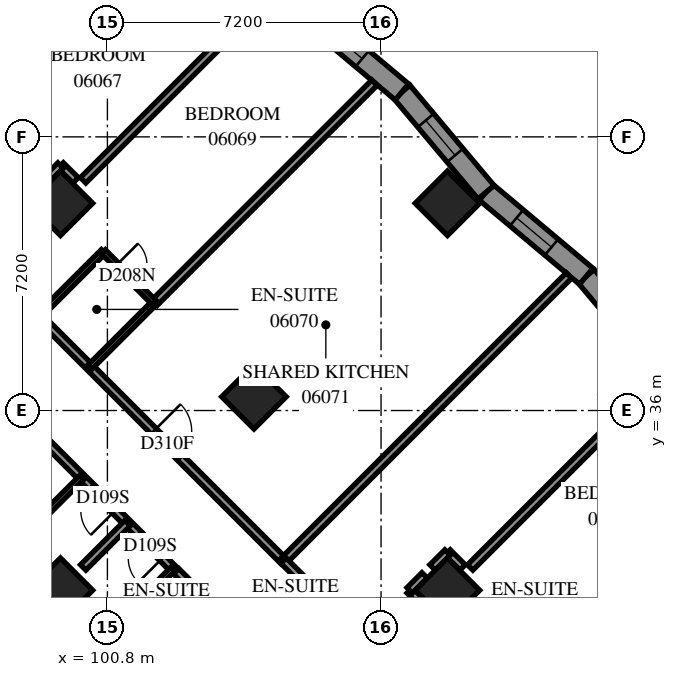
"""IFC4 building model, lengths in metres.
Left out: names, types, materials, properties, quantities, classifications, styles, units other than length and angle.
Written with IfcOpenShell. Run it as: python <this file> out.ifc"""

import sys

from ifc_helpers import new_model, si_unit, direction, frame, frame_2d, origin, origin_2d, place, context, subcontext, project, spatial, polyline, rectangle, outline, extrude, element, fill, save


model = new_model("IFC4")
c1 = context("Model", 3, precision=1e-05, world=origin(), true_north=direction((0.0, 1.0)))
c2 = subcontext(c1, "Body", "Model", "MODEL_VIEW")
j1 = project(units=[si_unit("LENGTHUNIT", "METRE"), si_unit("PLANEANGLEUNIT", "RADIAN")], contexts=[c1])
p1 = place(None, origin())
s1 = spatial("IfcSite", under=j1, at=p1, CompositionType="ELEMENT")
p2 = place(p1, origin())
s2 = spatial("IfcBuilding", under=s1, at=p2, CompositionType="ELEMENT")
p3 = place(p2, frame((0.0, 0.0, 27.0)))
s3 = spatial("IfcBuildingStorey", under=s2, at=p3, CompositionType="ELEMENT", Elevation=27.0)
for number, where, z_axis, x_axis in (
    (1, (99.565, 41.453, 0.0), (0.0, 0.0, 1.0), (0.707, -0.707, 0.0)),
    (2, (109.747, 41.453, 0.0), (0.0, 0.0, 1.0), (0.707, -0.707, 0.0)),
    (3, (104.656, 36.362, 0.0), (0.0, 0.0, 1.0), (0.707, -0.707, 0.0)),
    (4, (99.565, 31.271, 0.0), (0.0, 0.0, 1.0), (0.707, -0.707, 0.0)),
    (5, (109.747, 31.271, 0.0), (0.0, 0.0, 1.0), (0.707, -0.707, 0.0)),
):
    element("IfcColumn", number, at=place(p3, frame(where, z_axis=z_axis, x_axis=x_axis)), inside=s3, PredefinedType="COLUMN", context=c2, shape_type="SweptSolid", body=[
        extrude(rectangle(XDim=1.2, YDim=1.2, at=origin_2d()), origin(), (0.0, 0.0, 1.0), 3.1),
    ])
p4 = place(p3, frame((115.627, 36.876, 0.0), z_axis=(0.0, 0.0, 1.0), x_axis=(-0.6427914459, 0.7660412241, 0.0)))
e6 = element("IfcWall", 6, at=p4, inside=s3, PredefinedType="SOLIDWALL", context=c2, shape_type="SweptSolid", body=[
    extrude(outline(polyline([(0.048, -0.275), (3.49, -0.275), (3.442, 0.275), (-0.048, 0.275), (0.048, -0.275)])), origin(), (0.0, 0.0, 1.0), 3.1),
])
p5 = place(p4, frame((1.121, 0.0, 0.5)))
e7 = element("IfcOpeningElement", 7, at=p5, cuts=e6, PredefinedType="OPENING", context=c2, shape_type="SweptSolid", body=[
    extrude(rectangle(XDim=1.2, YDim=2.45, at=frame_2d((0.6, 1.225))), frame((0.0, 0.285, 0.0), z_axis=(0.0, -1.0, 0.0), x_axis=(1.0, 0.0, 0.0)), (0.0, 0.0, 1.0), 0.57),
])
p6 = place(p3, frame((113.399, 39.532, 0.0), z_axis=(0.0, 0.0, 1.0), x_axis=(-0.7660429609, 0.6427893761, 0.0)))
e8 = element("IfcWall", 8, at=p6, inside=s3, PredefinedType="SOLIDWALL", context=c2, shape_type="SweptSolid", body=[
    extrude(outline(polyline([(-0.024, -0.275), (3.418, -0.275), (3.466, 0.275), (0.024, 0.275), (-0.024, -0.275)])), origin(), (0.0, 0.0, 1.0), 3.1),
])
p7 = place(p6, frame((1.192, 0.0, 0.5)))
e9 = element("IfcOpeningElement", 9, at=p7, cuts=e8, PredefinedType="OPENING", context=c2, shape_type="SweptSolid", body=[
    extrude(rectangle(XDim=1.2, YDim=2.45, at=frame_2d((0.6, 1.225))), frame((0.0, 0.285, 0.0), z_axis=(0.0, -1.0, 0.0), x_axis=(1.0, 0.0, 0.0)), (0.0, 0.0, 1.0), 0.57),
])
p8 = place(p3, frame((110.762, 41.744, 0.0), z_axis=(0.0, 0.0, 1.0), x_axis=(-0.6428036801, 0.7660309582, 0.0)))
e10 = element("IfcWall", 10, at=p8, inside=s3, PredefinedType="SOLIDWALL", context=c2, shape_type="SweptSolid", body=[
    extrude(outline(polyline([(0.024, -0.275), (3.466, -0.275), (3.418, 0.275), (-0.024, 0.275), (0.024, -0.275)])), origin(), (0.0, 0.0, 1.0), 3.1),
])
p9 = place(p8, frame((1.266, 0.0, 0.5)))
e11 = element("IfcOpeningElement", 11, at=p9, cuts=e10, PredefinedType="OPENING", context=c2, shape_type="SweptSolid", body=[
    extrude(rectangle(XDim=1.2, YDim=2.45, at=frame_2d((0.6, 1.225))), frame((0.0, 0.285, 0.0), z_axis=(0.0, -1.0, 0.0), x_axis=(1.0, 0.0, 0.0)), (0.0, 0.0, 1.0), 0.57),
])
p10 = place(p3, frame((108.549, 44.381, 0.0), z_axis=(0.0, 0.0, 1.0), x_axis=(-0.7660309582, 0.6428036801, 0.0)))
e12 = element("IfcWall", 12, at=p10, inside=s3, PredefinedType="SOLIDWALL", context=c2, shape_type="SweptSolid", body=[
    extrude(outline(polyline([(-0.024, -0.275), (3.418, -0.275), (3.466, 0.275), (0.024, 0.275), (-0.024, -0.275)])), origin(), (0.0, 0.0, 1.0), 3.1),
])
p11 = place(p10, frame((1.364, 0.0, 0.5)))
e13 = element("IfcOpeningElement", 13, at=p11, cuts=e12, PredefinedType="OPENING", context=c2, shape_type="SweptSolid", body=[
    extrude(rectangle(XDim=1.2, YDim=2.45, at=frame_2d((0.6, 1.225))), frame((0.0, 0.285, 0.0), z_axis=(0.0, -1.0, 0.0), x_axis=(1.0, 0.0, 0.0)), (0.0, 0.0, 1.0), 0.57),
])
p12 = place(p3, frame((94.895, 42.581, 0.0), z_axis=(0.0, 0.0, 1.0), x_axis=(0.7071067812, -0.7071067812, 0.0)))
e14 = element("IfcWall", 14, at=p12, inside=s3, PredefinedType="PARTITIONING", context=c2, shape_type="SweptSolid", body=[
    extrude(rectangle(XDim=14.9, YDim=0.2, at=frame_2d((7.45, 0.0))), origin(), (0.0, 0.0, 1.0), 3.1),
])
p13 = place(p12, frame((2.8, 0.0, 0.0)))
e15 = element("IfcOpeningElement", 15, at=p13, cuts=e14, PredefinedType="OPENING", context=c2, shape_type="SweptSolid", body=[
    extrude(rectangle(XDim=0.9, YDim=2.1, at=frame_2d((0.45, 1.05))), frame((0.0, 0.11, 0.0), z_axis=(0.0, -1.0, 0.0), x_axis=(1.0, 0.0, 0.0)), (0.0, 0.0, 1.0), 0.22),
])
p14 = place(p12, frame((4.348, 0.0, 0.0)))
e16 = element("IfcOpeningElement", 16, at=p14, cuts=e14, PredefinedType="OPENING", context=c2, shape_type="SweptSolid", body=[
    extrude(rectangle(XDim=0.9, YDim=2.1, at=frame_2d((0.45, 1.05))), frame((0.0, 0.11, 0.0), z_axis=(0.0, -1.0, 0.0), x_axis=(1.0, 0.0, 0.0)), (0.0, 0.0, 1.0), 0.22),
])
p15 = place(p12, frame((10.073, 0.0, 0.0)))
e17 = element("IfcOpeningElement", 17, at=p15, cuts=e14, PredefinedType="OPENING", context=c2, shape_type="SweptSolid", body=[
    extrude(rectangle(XDim=1.0, YDim=2.1, at=frame_2d((0.5, 1.05))), frame((0.0, 0.11, 0.0), z_axis=(0.0, -1.0, 0.0), x_axis=(1.0, 0.0, 0.0)), (0.0, 0.0, 1.0), 0.22),
])
p16 = place(p3, frame((102.609, 31.769, 0.0), z_axis=(0.0, 0.0, 1.0), x_axis=(0.7071067812, -0.7071067812, 0.0)))
e18 = element("IfcWall", 18, at=p16, inside=s3, PredefinedType="PARTITIONING", context=c2, shape_type="SweptSolid", body=[
    extrude(rectangle(XDim=10.723, YDim=0.2, at=frame_2d((5.361, 0.0))), origin(), (0.0, 0.0, 1.0), 3.1),
])
p17 = place(p16, frame((4.15, 0.0, 0.0)))
e19 = element("IfcOpeningElement", 19, at=p17, cuts=e18, PredefinedType="OPENING", context=c2, shape_type="SweptSolid", body=[
    extrude(rectangle(XDim=0.9, YDim=2.1, at=frame_2d((0.45, 1.05))), frame((0.0, 0.11, 0.0), z_axis=(0.0, -1.0, 0.0), x_axis=(1.0, 0.0, 0.0)), (0.0, 0.0, 1.0), 0.22),
])
p18 = place(p16, frame((5.8, 0.0, 0.0)))
e20 = element("IfcOpeningElement", 20, at=p18, cuts=e18, PredefinedType="OPENING", context=c2, shape_type="SweptSolid", body=[
    extrude(rectangle(XDim=0.9, YDim=2.1, at=frame_2d((0.45, 1.05))), frame((0.0, 0.11, 0.0), z_axis=(0.0, -1.0, 0.0), x_axis=(1.0, 0.0, 0.0)), (0.0, 0.0, 1.0), 0.22),
])
p19 = place(p3, frame((105.437, 32.045, 0.0), z_axis=(0.0, 0.0, 1.0), x_axis=(0.7070125995, 0.7072009503, 0.0)))
e21 = element("IfcWall", 21, at=p19, inside=s3, PredefinedType="PARTITIONING", context=c2, shape_type="SweptSolid", body=[
    extrude(rectangle(XDim=10.618, YDim=0.2, at=frame_2d((5.309, 0.0))), origin(), (0.0, 0.0, 1.0), 3.1),
])
p20 = place(p3, frame((94.901, 42.583, 0.0), z_axis=(0.0, 0.0, 1.0), x_axis=(0.7072154749, 0.7069980708, 0.0)))
e22 = element("IfcWall", 22, at=p20, inside=s3, PredefinedType="PARTITIONING", context=c2, shape_type="SweptSolid", body=[
    extrude(rectangle(XDim=9.2, YDim=0.2, at=frame_2d((4.6, 0.0))), origin(), (0.0, 0.0, 1.0), 3.1),
])
p21 = place(p3, frame((102.039, 38.837, 0.0), z_axis=(0.0, 0.0, 1.0), x_axis=(0.7071067812, 0.7071067812, 0.0)))
e23 = element("IfcWall", 23, at=p21, inside=s3, PredefinedType="PARTITIONING", context=c2, shape_type="SweptSolid", body=[
    extrude(rectangle(XDim=8.188, YDim=0.2, at=frame_2d((4.094, 0.0))), origin(), (0.0, 0.0, 1.0), 3.1),
])
p22 = place(p3, frame((96.947, 43.929, 0.0), z_axis=(0.0, 0.0, 1.0), x_axis=(0.7071067812, 0.7071067812, 0.0)))
e24 = element("IfcWall", 24, at=p22, inside=s3, PredefinedType="PARTITIONING", context=c2, shape_type="SweptSolid", body=[
    extrude(rectangle(XDim=8.159, YDim=0.2, at=frame_2d((4.079, 0.0))), origin(), (0.0, 0.0, 1.0), 3.1),
])
p23 = place(p3, frame((102.531, 31.833, 0.0), z_axis=(0.0, 0.0, 1.0), x_axis=(-0.7070095491, 0.7072039999, 0.0)))
e25 = element("IfcWall", 25, at=p23, inside=s3, PredefinedType="PARTITIONING", context=c2, shape_type="SweptSolid", body=[
    extrude(rectangle(XDim=7.2, YDim=0.2, at=frame_2d((3.6, 0.0))), origin(), (0.0, 0.0, 1.0), 3.1),
])
p24 = place(p23, frame((2.165, 0.0, 0.0)))
e26 = element("IfcOpeningElement", 26, at=p24, cuts=e25, PredefinedType="OPENING", context=c2, shape_type="SweptSolid", body=[
    extrude(rectangle(XDim=0.9, YDim=2.1, at=frame_2d((0.45, 1.05))), frame((0.0, 0.11, 0.0), z_axis=(0.0, -1.0, 0.0), x_axis=(1.0, 0.0, 0.0)), (0.0, 0.0, 1.0), 0.22),
])
p25 = place(p23, frame((0.4, 0.0, 0.0)))
e27 = element("IfcOpeningElement", 27, at=p25, cuts=e25, PredefinedType="OPENING", context=c2, shape_type="SweptSolid", body=[
    extrude(rectangle(XDim=0.9, YDim=2.1, at=frame_2d((0.45, 1.05))), frame((0.0, 0.11, 0.0), z_axis=(0.0, -1.0, 0.0), x_axis=(1.0, 0.0, 0.0)), (0.0, 0.0, 1.0), 0.22),
])
p26 = place(p3, frame((110.345, 31.871, 0.0), z_axis=(0.0, 0.0, 1.0), x_axis=(0.7071067812, 0.7071067812, 0.0)))
e28 = element("IfcWall", 28, at=p26, inside=s3, PredefinedType="PARTITIONING", context=c2, shape_type="SweptSolid", body=[
    extrude(rectangle(XDim=5.504, YDim=0.2, at=frame_2d((2.752, 0.0))), origin(), (0.0, 0.0, 1.0), 3.1),
])
p27 = place(p3, frame((100.161, 42.057, 0.0), z_axis=(0.0, 0.0, 1.0), x_axis=(0.7072884866, 0.706925029, 0.0)))
e29 = element("IfcWall", 29, at=p27, inside=s3, PredefinedType="PARTITIONING", context=c2, shape_type="SweptSolid", body=[
    extrude(rectangle(XDim=5.503, YDim=0.2, at=frame_2d((2.751, 0.0))), origin(), (0.0, 0.0, 1.0), 3.1),
])
p28 = place(p3, frame((105.435, 32.049, 0.0), z_axis=(0.0, 0.0, 1.0), x_axis=(0.7074545101, -0.7067588812, 0.0)))
e30 = element("IfcWall", 30, at=p28, inside=s3, PredefinedType="PARTITIONING", context=c2, shape_type="SweptSolid", body=[
    extrude(rectangle(XDim=2.875, YDim=0.2, at=frame_2d((1.438, 0.0))), origin(), (0.0, 0.0, 1.0), 3.1),
])
for number, where, z_axis, x_axis in (
    (31, (100.34, 37.142, 0.0), (0.0, 0.0, 1.0), (0.708, 0.707, 0.0)),
    (32, (98.996, 38.486, 0.0), (0.0, 0.0, 1.0), (0.708, 0.707, 0.0)),
):
    element("IfcWall", number, at=place(p3, frame(where, z_axis=z_axis, x_axis=x_axis)), inside=s3, PredefinedType="PARTITIONING", context=c2, shape_type="SweptSolid", body=[
        extrude(rectangle(XDim=2.4, YDim=0.15, at=frame_2d((1.2, 0.0))), origin(), (0.0, 0.0, 1.0), 3.1),
    ])
for number, where, z_axis, x_axis in (
    (33, (100.837, 30.141, 0.0), (0.0, 0.0, 1.0), (0.707, 0.707, 0.0)),
    (34, (98.433, 32.545, 0.0), (0.0, 0.0, 1.0), (0.707, 0.707, 0.0)),
):
    element("IfcWall", number, at=place(p3, frame(where, z_axis=z_axis, x_axis=x_axis)), inside=s3, PredefinedType="PARTITIONING", context=c2, shape_type="SweptSolid", body=[
        extrude(rectangle(XDim=2.398, YDim=0.15, at=frame_2d((1.199, 0.0))), origin(), (0.0, 0.0, 1.0), 3.1),
    ])
p29 = place(p3, frame((100.693, 40.177, 0.0), z_axis=(0.0, 0.0, 1.0), x_axis=(0.7071067812, -0.7071067812, 0.0)))
e35 = element("IfcWall", 35, at=p29, inside=s3, PredefinedType="PARTITIONING", context=c2, shape_type="SweptSolid", body=[
    extrude(rectangle(XDim=1.901, YDim=0.15, at=frame_2d((0.95, 0.0))), origin(), (0.0, 0.0, 1.0), 3.1),
])
p30 = place(p29, frame((0.493, 0.0, 0.0)))
e36 = element("IfcOpeningElement", 36, at=p30, cuts=e35, PredefinedType="OPENING", context=c2, shape_type="SweptSolid", body=[
    extrude(rectangle(XDim=0.8, YDim=2.1, at=frame_2d((0.4, 1.05))), frame((0.0, 0.085, 0.0), z_axis=(0.0, -1.0, 0.0), x_axis=(1.0, 0.0, 0.0)), (0.0, 0.0, 1.0), 0.17),
])
p31 = place(p3, frame((100.163, 31.871, 0.0), z_axis=(0.0, 0.0, 1.0), x_axis=(0.7071067812, 0.7071067812, 0.0)))
e37 = element("IfcWall", 37, at=p31, inside=s3, PredefinedType="PARTITIONING", context=c2, shape_type="SweptSolid", body=[
    extrude(rectangle(XDim=1.652, YDim=0.2, at=frame_2d((0.826, 0.0))), origin(), (0.0, 0.0, 1.0), 3.1),
])
for number, where, z_axis, x_axis in (
    (38, (108.754, 31.268, 0.0), (0.0, 0.0, 1.0), (0.707, -0.707, 0.0)),
    (39, (109.751, 32.265, 0.0), (0.0, 0.0, 1.0), (0.707, -0.707, 0.0)),
    (40, (109.355, 31.871, 0.0), (0.0, 0.0, 1.0), (0.707, 0.707, 0.0)),
    (41, (108.753, 31.269, 0.0), (0.0, 0.0, 1.0), (0.707, 0.707, 0.0)),
):
    element("IfcWall", number, at=place(p3, frame(where, z_axis=z_axis, x_axis=x_axis)), inside=s3, PredefinedType="PARTITIONING", context=c2, shape_type="SweptSolid", body=[
        extrude(rectangle(XDim=0.557, YDim=0.2, at=frame_2d((0.279, 0.0))), origin(), (0.0, 0.0, 1.0), 3.1),
    ])
p32 = place(p3, frame((99.571, 42.449, 0.0), z_axis=(0.0, 0.0, 1.0), x_axis=(0.7089037401, -0.705305244, 0.0)))
e42 = element("IfcWall", 42, at=p32, inside=s3, PredefinedType="PARTITIONING", context=c2, shape_type="SweptSolid", body=[
    extrude(rectangle(XDim=0.556, YDim=0.2, at=frame_2d((0.278, 0.0))), origin(), (0.0, 0.0, 1.0), 3.1),
])
p33 = place(p3, frame((99.175, 42.055, 0.0), z_axis=(0.0, 0.0, 1.0), x_axis=(0.7071067812, 0.7071067812, 0.0)))
e43 = element("IfcWall", 43, at=p33, inside=s3, PredefinedType="PARTITIONING", context=c2, shape_type="SweptSolid", body=[
    extrude(rectangle(XDim=0.554, YDim=0.2, at=frame_2d((0.277, 0.0))), origin(), (0.0, 0.0, 1.0), 3.1),
])
p34 = place(p7, origin())
e44 = element("IfcWindow", 44, at=p34, inside=s3, PartitioningType="SINGLE_PANEL", PredefinedType="WINDOW", context=c2, shape_type="SweptSolid", body=[
    extrude(rectangle(XDim=1.2, YDim=2.45, at=frame_2d((0.6, 1.225))), frame((0.0, 0.155, 0.0), z_axis=(0.0, -1.0, 0.0), x_axis=(1.0, 0.0, 0.0)), (0.0, 0.0, 1.0), 0.06),
])
fill(e9, e44)
p35 = place(p9, origin())
e45 = element("IfcWindow", 45, at=p35, inside=s3, PartitioningType="SINGLE_PANEL", PredefinedType="WINDOW", context=c2, shape_type="SweptSolid", body=[
    extrude(rectangle(XDim=1.2, YDim=2.45, at=frame_2d((0.6, 1.225))), frame((0.0, 0.155, 0.0), z_axis=(0.0, -1.0, 0.0), x_axis=(1.0, 0.0, 0.0)), (0.0, 0.0, 1.0), 0.06),
])
fill(e11, e45)
p36 = place(p11, origin())
e46 = element("IfcWindow", 46, at=p36, inside=s3, PartitioningType="SINGLE_PANEL", PredefinedType="WINDOW", context=c2, shape_type="SweptSolid", body=[
    extrude(rectangle(XDim=1.2, YDim=2.45, at=frame_2d((0.6, 1.225))), frame((0.0, 0.155, 0.0), z_axis=(0.0, -1.0, 0.0), x_axis=(1.0, 0.0, 0.0)), (0.0, 0.0, 1.0), 0.06),
])
fill(e13, e46)
p37 = place(p30, origin())
e47 = element("IfcDoor", 47, at=p37, inside=s3, OperationType="SINGLE_SWING_RIGHT", PredefinedType="DOOR", context=c2, shape_type="SweptSolid", body=[
    extrude(rectangle(XDim=0.8, YDim=2.1, at=frame_2d((0.4, 1.05))), frame((0.0, 0.025, 0.0), z_axis=(0.0, -1.0, 0.0), x_axis=(1.0, 0.0, 0.0)), (0.0, 0.0, 1.0), 0.05),
])
fill(e36, e47)
p38 = place(p15, origin())
e48 = element("IfcDoor", 48, at=p38, inside=s3, OperationType="SINGLE_SWING_RIGHT", PredefinedType="DOOR", context=c2, shape_type="SweptSolid", body=[
    extrude(rectangle(XDim=1.0, YDim=2.1, at=frame_2d((0.5, 1.05))), frame((0.0, 0.025, 0.0), z_axis=(0.0, -1.0, 0.0), x_axis=(1.0, 0.0, 0.0)), (0.0, 0.0, 1.0), 0.05),
])
fill(e17, e48)
p39 = place(p24, origin())
e49 = element("IfcDoor", 49, at=p39, inside=s3, OperationType="SINGLE_SWING_LEFT", PredefinedType="DOOR", context=c2, shape_type="SweptSolid", body=[
    extrude(rectangle(XDim=0.9, YDim=2.1, at=frame_2d((0.45, 1.05))), frame((0.0, 0.025, 0.0), z_axis=(0.0, -1.0, 0.0), x_axis=(1.0, 0.0, 0.0)), (0.0, 0.0, 1.0), 0.05),
])
fill(e26, e49)
p40 = place(p25, origin())
e50 = element("IfcDoor", 50, at=p40, inside=s3, OperationType="SINGLE_SWING_RIGHT", PredefinedType="DOOR", context=c2, shape_type="SweptSolid", body=[
    extrude(rectangle(XDim=0.9, YDim=2.1, at=frame_2d((0.45, 1.05))), frame((0.0, 0.025, 0.0), z_axis=(0.0, -1.0, 0.0), x_axis=(1.0, 0.0, 0.0)), (0.0, 0.0, 1.0), 0.05),
])
fill(e27, e50)
save(model, sys.argv[1])
